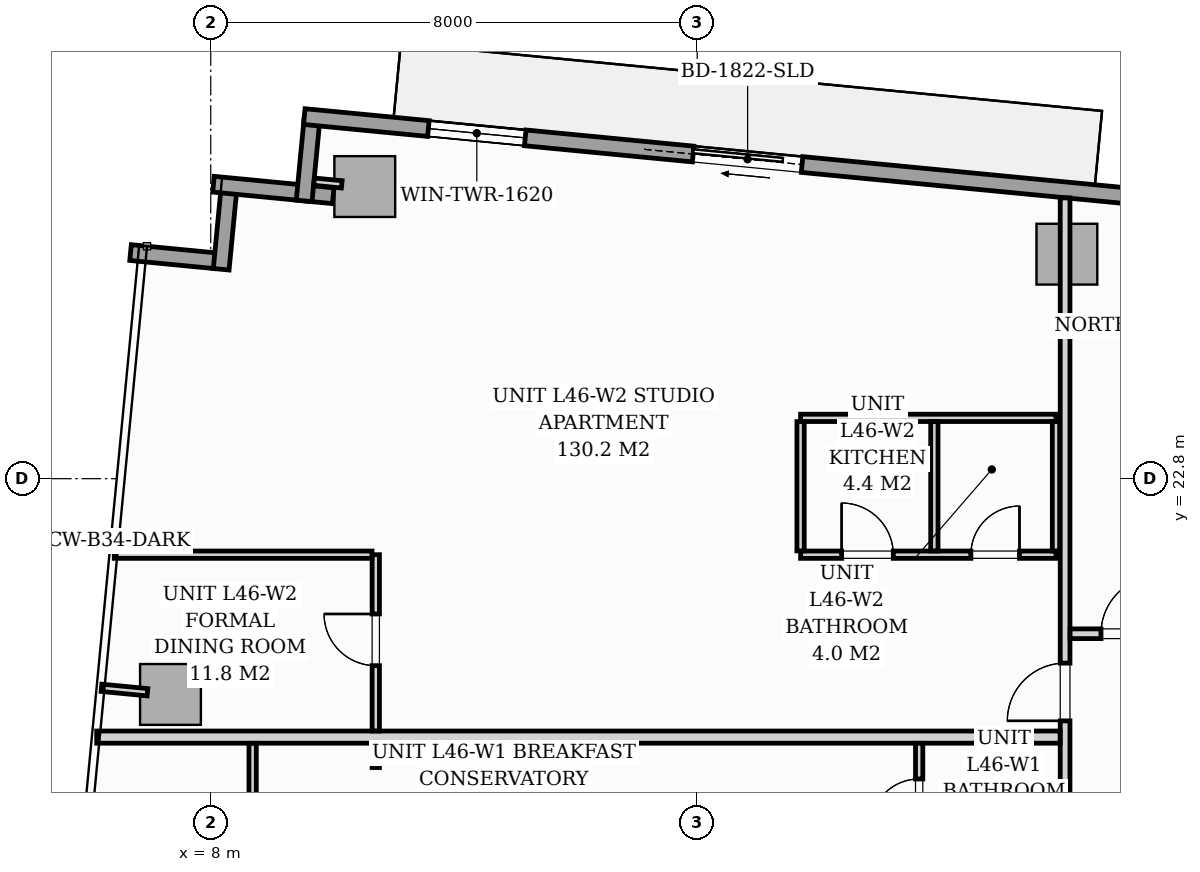
"""IFC4 building model, lengths in metres.
Left out: names, types, materials, properties, quantities, classifications, styles, units other than length and angle.
Written with IfcOpenShell. Run it as: python <this file> out.ifc"""

import sys

from ifc_helpers import new_model, si_unit, direction, frame, frame_2d, origin, origin_2d, place, context, subcontext, project, spatial, rectangle, extrude, source, transform, mapped, element, fill, save


model = new_model("IFC4")
c1 = context("Model", 3, precision=1e-05, world=origin(), true_north=direction((0.0, 1.0)))
c2 = subcontext(c1, "Body", "Model", "MODEL_VIEW")
j1 = project(units=[si_unit("LENGTHUNIT", "METRE"), si_unit("PLANEANGLEUNIT", "RADIAN")], contexts=[c1])
p1 = place(None, origin())
s1 = spatial("IfcSite", under=j1, at=p1, CompositionType="ELEMENT")
p2 = place(p1, origin())
s2 = spatial("IfcBuilding", under=s1, at=p2, CompositionType="ELEMENT")
p3 = place(p2, frame((0.0, 0.0, 159.8)))
s3 = spatial("IfcBuildingStorey", under=s2, at=p3, CompositionType="ELEMENT", Elevation=159.8)
m1 = source(origin(), c2, "Body", "SweptSolid", [
    extrude(rectangle(XDim=1.0, YDim=1.0, at=origin_2d()), origin(), (0.0, 0.0, 1.0), 3.194),
])
for number, where, z_axis, x_axis in (
    (1, (10.533, 27.604, 0.002), (0.0, 0.0, 1.0), (0.995, -0.096, 0.0)),
    (2, (22.08, 26.492, 0.002), (0.0, 0.0, 1.0), (0.995, -0.096, 0.0)),
    (3, (7.338, 19.252, 0.002), (0.0, 0.0, 1.0), (0.995, -0.096, 0.0)),
):
    element("IfcColumn", number, at=place(p3, frame(where, z_axis=z_axis, x_axis=x_axis)), inside=s3, PredefinedType="COLUMN", context=c2, shape_type="MappedRepresentation", body=[
        mapped(m1, transform((0.0, 0.0, 0.0), scale=1.0)),
    ])
p4 = place(p3, frame((6.681, 26.518, 0.0), z_axis=(0.0, 0.0, 1.0), x_axis=(0.995389446633, -0.095915846097, 0.0)))
e4 = element("IfcWall", 4, at=p4, inside=s3, PredefinedType="STANDARD", context=c2, shape_type="SweptSolid", body=[
    extrude(rectangle(XDim=1.395, YDim=0.26, at=frame_2d((0.697, 0.0))), origin(), (0.0, 0.0, 1.0), 2.9),
])
p5 = place(p3, frame((8.172, 26.244, 0.0), z_axis=(0.0, 0.0, 1.0), x_axis=(0.095725744959, 0.99540774648, 0.0)))
e5 = element("IfcWall", 5, at=p5, inside=s3, PredefinedType="STANDARD", context=c2, shape_type="SweptSolid", body=[
    extrude(rectangle(XDim=1.395, YDim=0.26, at=frame_2d((0.698, 0.0))), origin(), (0.0, 0.0, 1.0), 2.9),
])
p6 = place(p3, frame((8.045, 27.643, 0.0), z_axis=(0.0, 0.0, 1.0), x_axis=(0.995391147587, -0.095898192396, 0.0)))
e6 = element("IfcWall", 6, at=p6, inside=s3, PredefinedType="STANDARD", context=c2, shape_type="SweptSolid", body=[
    extrude(rectangle(XDim=1.978, YDim=0.26, at=frame_2d((0.989, 0.0))), origin(), (0.0, 0.0, 1.0), 2.9),
])
p7 = place(p3, frame((9.536, 27.368, 0.0), z_axis=(0.0, 0.0, 1.0), x_axis=(0.095915846097, 0.995389446633, 0.0)))
e7 = element("IfcWall", 7, at=p7, inside=s3, PredefinedType="STANDARD", context=c2, shape_type="SweptSolid", body=[
    extrude(rectangle(XDim=1.395, YDim=0.26, at=frame_2d((0.697, 0.0))), origin(), (0.0, 0.0, 1.0), 2.9),
])
p8 = place(p3, frame((9.539, 28.754, 0.0), z_axis=(0.0, 0.0, 1.0), x_axis=(0.995397345886, -0.09583383433, 0.0)))
e8 = element("IfcWall", 8, at=p8, inside=s3, PredefinedType="STANDARD", context=c2, shape_type="SweptSolid", body=[
    extrude(rectangle(XDim=17.01, YDim=0.26, at=frame_2d((8.505, 0.0))), origin(), (0.0, 0.0, 1.0), 2.9),
])
p9 = place(p8, frame((6.424, 0.0, 0.0)))
e9 = element("IfcOpeningElement", 9, at=p9, cuts=e8, PredefinedType="OPENING", context=c2, shape_type="SweptSolid", body=[
    extrude(rectangle(XDim=1.8, YDim=2.06, at=frame_2d((0.9, 1.03))), frame((0.0, 0.14, 0.0), z_axis=(0.0, -1.0, 0.0), x_axis=(1.0, 0.0, 0.0)), (0.0, 0.0, 1.0), 0.28),
])
p10 = place(p8, frame((2.05, 0.0, 0.65)))
e10 = element("IfcOpeningElement", 10, at=p10, cuts=e8, PredefinedType="OPENING", context=c2, shape_type="SweptSolid", body=[
    extrude(rectangle(XDim=1.6, YDim=1.5, at=frame_2d((0.8, 0.75))), frame((0.0, 0.14, 0.0), z_axis=(0.0, -1.0, 0.0), x_axis=(1.0, 0.0, 0.0)), (0.0, 0.0, 1.0), 0.28),
])
p11 = place(p3, frame((22.05, 12.732, 0.0), z_axis=(0.0, 0.0, 1.0), x_axis=(0.0, 1.0, 0.0)))
e11 = element("IfcWall", 11, at=p11, inside=s3, PredefinedType="PARTITIONING", context=c2, shape_type="SweptSolid", body=[
    extrude(rectangle(XDim=14.685, YDim=0.16, at=frame_2d((7.343, 0.0))), origin(), (0.0, 0.0, 1.0), 2.9),
])
p12 = place(p11, frame((0.493, 0.0, 0.0)))
e12 = element("IfcOpeningElement", 12, at=p12, cuts=e11, PredefinedType="OPENING", context=c2, shape_type="SweptSolid", body=[
    extrude(rectangle(XDim=0.95, YDim=2.06, at=frame_2d((0.475, 1.03))), frame((0.0, 0.09, 0.0), z_axis=(0.0, -1.0, 0.0), x_axis=(1.0, 0.0, 0.0)), (0.0, 0.0, 1.0), 0.18),
])
p13 = place(p11, frame((6.085, 0.0, 0.0)))
e13 = element("IfcOpeningElement", 13, at=p13, cuts=e11, PredefinedType="OPENING", context=c2, shape_type="SweptSolid", body=[
    extrude(rectangle(XDim=0.95, YDim=2.06, at=frame_2d((0.475, 1.03))), frame((0.0, 0.09, 0.0), z_axis=(0.0, -1.0, 0.0), x_axis=(1.0, 0.0, 0.0)), (0.0, 0.0, 1.0), 0.18),
])
p14 = place(p3, frame((6.125, 18.55, 0.0), z_axis=(0.0, 0.0, 1.0), x_axis=(1.0, 0.0, 0.0)))
e14 = element("IfcWall", 14, at=p14, inside=s3, PredefinedType="PARTITIONING", context=c2, shape_type="SweptSolid", body=[
    extrude(rectangle(XDim=15.843, YDim=0.2, at=frame_2d((7.921, 0.0))), origin(), (0.0, 0.0, 1.0), 2.023),
])
p15 = place(p3, frame((19.65, 14.5, 0.0), z_axis=(0.0, 0.0, 1.0), x_axis=(0.0, 1.0, 0.0)))
e15 = element("IfcWall", 15, at=p15, inside=s3, PredefinedType="PARTITIONING", context=c2, shape_type="SweptSolid", body=[
    extrude(rectangle(XDim=3.948, YDim=0.12, at=frame_2d((1.974, 0.0))), origin(), (0.0, 0.0, 1.0), 2.9),
])
p16 = place(p15, frame((0.563, 0.0, 0.0)))
e16 = element("IfcOpeningElement", 16, at=p16, cuts=e15, PredefinedType="OPENING", context=c2, shape_type="SweptSolid", body=[
    extrude(rectangle(XDim=0.85, YDim=2.05, at=frame_2d((0.425, 1.025))), frame((0.0, 0.07, 0.0), z_axis=(0.0, -1.0, 0.0), x_axis=(1.0, 0.0, 0.0)), (0.0, 0.0, 1.0), 0.14),
])
p17 = place(p15, frame((2.562, 0.0, 0.0)))
e17 = element("IfcOpeningElement", 17, at=p17, cuts=e15, PredefinedType="OPENING", context=c2, shape_type="SweptSolid", body=[
    extrude(rectangle(XDim=0.8, YDim=2.0, at=frame_2d((0.4, 1.0))), frame((0.0, 0.07, 0.0), z_axis=(0.0, -1.0, 0.0), x_axis=(1.0, 0.0, 0.0)), (0.0, 0.0, 1.0), 0.14),
])
p18 = place(p3, frame((8.689, 9.54, 0.0), z_axis=(0.0, 0.0, 1.0), x_axis=(0.0, 1.0, 0.0)))
e18 = element("IfcWall", 18, at=p18, inside=s3, PredefinedType="PARTITIONING", context=c2, shape_type="SweptSolid", body=[
    extrude(rectangle(XDim=8.908, YDim=0.12, at=frame_2d((4.454, 0.0))), origin(), (0.0, 0.0, 1.0), 2.343),
])
p19 = place(p18, frame((4.542, 0.0, 0.0)))
e19 = element("IfcOpeningElement", 19, at=p19, cuts=e18, PredefinedType="OPENING", context=c2, shape_type="SweptSolid", body=[
    extrude(rectangle(XDim=0.85, YDim=2.05, at=frame_2d((0.425, 1.025))), frame((0.0, 0.07, 0.0), z_axis=(0.0, -1.0, 0.0), x_axis=(1.0, 0.0, 0.0)), (0.0, 0.0, 1.0), 0.14),
])
p20 = place(p3, frame((17.7, 21.55, 0.0), z_axis=(0.0, 0.0, 1.0), x_axis=(1.0, 0.0, 0.0)))
e20 = element("IfcWall", 20, at=p20, inside=s3, PredefinedType="PARTITIONING", context=c2, shape_type="SweptSolid", body=[
    extrude(rectangle(XDim=4.2, YDim=0.12, at=frame_2d((2.1, 0.0))), origin(), (0.0, 0.0, 1.0), 2.9),
])
p21 = place(p20, frame((0.675, 0.0, 0.0)))
e21 = element("IfcOpeningElement", 21, at=p21, cuts=e20, PredefinedType="OPENING", context=c2, shape_type="SweptSolid", body=[
    extrude(rectangle(XDim=0.85, YDim=2.05, at=frame_2d((0.425, 1.025))), frame((0.0, 0.07, 0.0), z_axis=(0.0, -1.0, 0.0), x_axis=(1.0, 0.0, 0.0)), (0.0, 0.0, 1.0), 0.14),
])
p22 = place(p20, frame((2.8, 0.0, 0.0)))
e22 = element("IfcOpeningElement", 22, at=p22, cuts=e20, PredefinedType="OPENING", context=c2, shape_type="SweptSolid", body=[
    extrude(rectangle(XDim=0.8, YDim=2.0, at=frame_2d((0.4, 1.0))), frame((0.0, 0.07, 0.0), z_axis=(0.0, -1.0, 0.0), x_axis=(1.0, 0.0, 0.0)), (0.0, 0.0, 1.0), 0.14),
])
p23 = place(p3, frame((17.7, 23.8, 0.0), z_axis=(0.0, 0.0, 1.0), x_axis=(1.0, 0.0, 0.0)))
e23 = element("IfcWall", 23, at=p23, inside=s3, PredefinedType="PARTITIONING", context=c2, shape_type="SweptSolid", body=[
    extrude(rectangle(XDim=4.2, YDim=0.12, at=frame_2d((2.1, 0.0))), origin(), (0.0, 0.0, 1.0), 2.9),
])
for number, where, z_axis, x_axis in (
    (24, (17.7, 21.612, 0.0), (0.0, 0.0, 1.0), (0.0, 1.0, 0.0)),
    (25, (19.9, 21.612, 0.0), (0.0, 0.0, 1.0), (0.0, 1.0, 0.0)),
    (26, (21.9, 21.612, 0.0), (0.0, 0.0, 1.0), (0.0, 1.0, 0.0)),
):
    element("IfcWall", number, at=place(p3, frame(where, z_axis=z_axis, x_axis=x_axis)), inside=s3, PredefinedType="PARTITIONING", context=c2, shape_type="SweptSolid", body=[
        extrude(rectangle(XDim=2.126, YDim=0.12, at=frame_2d((1.063, 0.0))), origin(), (0.0, 0.0, 1.0), 2.9),
    ])
p24 = place(p3, frame((10.714, 18.05, 0.0), z_axis=(0.0, 0.0, 1.0), x_axis=(0.0, 1.0, 0.0)))
e27 = element("IfcWall", 27, at=p24, inside=s3, PredefinedType="PARTITIONING", context=c2, shape_type="SweptSolid", body=[
    extrude(rectangle(XDim=0.398, YDim=0.12, at=frame_2d((0.199, 0.0))), origin(), (0.0, 0.0, 1.0), 2.9),
])
p25 = place(p3, frame((10.714, 18.652, 0.0), z_axis=(0.0, 0.0, 1.0), x_axis=(0.0, 1.0, 0.0)))
e28 = element("IfcWall", 28, at=p25, inside=s3, PredefinedType="PARTITIONING", context=c2, shape_type="SweptSolid", body=[
    extrude(rectangle(XDim=2.898, YDim=0.12, at=frame_2d((1.449, 0.0))), origin(), (0.0, 0.0, 1.0), 2.9),
])
p26 = place(p25, frame((1.073, 0.0, 0.0)))
e29 = element("IfcOpeningElement", 29, at=p26, cuts=e28, PredefinedType="OPENING", context=c2, shape_type="SweptSolid", body=[
    extrude(rectangle(XDim=0.85, YDim=2.05, at=frame_2d((0.425, 1.025))), frame((0.0, 0.07, 0.0), z_axis=(0.0, -1.0, 0.0), x_axis=(1.0, 0.0, 0.0)), (0.0, 0.0, 1.0), 0.14),
])
p27 = place(p3, frame((6.414, 21.55, 0.0), z_axis=(0.0, 0.0, 1.0), x_axis=(1.0, 0.0, 0.0)))
e30 = element("IfcWall", 30, at=p27, inside=s3, PredefinedType="PARTITIONING", context=c2, shape_type="SweptSolid", body=[
    extrude(rectangle(XDim=4.238, YDim=0.12, at=frame_2d((2.119, 0.0))), origin(), (0.0, 0.0, 1.0), 2.9),
])
p28 = place(p3, frame((22.132, 20.25, 0.0), z_axis=(0.0, 0.0, 1.0), x_axis=(1.0, 0.0, 0.0)))
e31 = element("IfcWall", 31, at=p28, inside=s3, PredefinedType="PARTITIONING", context=c2, shape_type="SweptSolid", body=[
    extrude(rectangle(XDim=1.886, YDim=0.16, at=frame_2d((0.943, 0.0))), origin(), (0.0, 0.0, 1.0), 2.9),
])
p29 = place(p28, frame((0.508, 0.0, 0.0)))
e32 = element("IfcOpeningElement", 32, at=p29, cuts=e31, PredefinedType="OPENING", context=c2, shape_type="SweptSolid", body=[
    extrude(rectangle(XDim=0.95, YDim=2.06, at=frame_2d((0.475, 1.03))), frame((0.0, 0.09, 0.0), z_axis=(0.0, -1.0, 0.0), x_axis=(1.0, 0.0, 0.0)), (0.0, 0.0, 1.0), 0.18),
])
p30 = place(p3, frame((10.155, 27.64, 0.0), z_axis=(0.0, 0.0, 1.0), x_axis=(-0.995435366701, 0.095438098896, 0.0)))
e33 = element("IfcWall", 33, at=p30, inside=s3, PredefinedType="PARTITIONING", context=c2, shape_type="SweptSolid", body=[
    extrude(rectangle(XDim=0.458, YDim=0.12, at=frame_2d((0.229, 0.0))), origin(), (0.0, 0.0, 1.0), 2.9),
])
p31 = place(p3, frame((6.959, 19.288, 0.0), z_axis=(0.0, 0.0, 1.0), x_axis=(-0.995377786728, 0.096036772582, 0.0)))
e34 = element("IfcWall", 34, at=p31, inside=s3, PredefinedType="PARTITIONING", context=c2, shape_type="SweptSolid", body=[
    extrude(rectangle(XDim=0.76, YDim=0.12, at=frame_2d((0.38, 0.0))), origin(), (0.0, 0.0, 1.0), 2.9),
])
m2 = source(origin(), c2, "Body", "SweptSolid", [
    extrude(rectangle(XDim=1.8, YDim=2.06, at=frame_2d((0.9, 1.03))), frame((0.0, 0.025, 0.0), z_axis=(0.0, -1.0, 0.0), x_axis=(1.0, 0.0, 0.0)), (0.0, 0.0, 1.0), 0.05),
])
p32 = place(p9, origin())
e35 = element("IfcDoor", 35, at=p32, inside=s3, OperationType="SLIDING_TO_LEFT", PredefinedType="DOOR", context=c2, shape_type="MappedRepresentation", body=[
    mapped(m2, transform((0.0, 0.0, 0.0), scale=1.0)),
])
fill(e9, e35)
m3 = source(origin(), c2, "Body", "SweptSolid", [
    extrude(rectangle(XDim=1.6, YDim=1.5, at=frame_2d((0.8, 0.75))), frame((0.0, 0.03, 0.0), z_axis=(0.0, -1.0, 0.0), x_axis=(1.0, 0.0, 0.0)), (0.0, 0.0, 1.0), 0.06),
])
p33 = place(p10, origin())
e36 = element("IfcWindow", 36, at=p33, inside=s3, PartitioningType="SINGLE_PANEL", PredefinedType="WINDOW", context=c2, shape_type="MappedRepresentation", body=[
    mapped(m3, transform((0.0, 0.0, 0.0), scale=1.0)),
])
fill(e10, e36)
m4 = source(origin(), c2, "Body", "SweptSolid", [
    extrude(rectangle(XDim=0.8, YDim=2.0, at=frame_2d((0.4, 1.0))), frame((0.0, 0.025, 0.0), z_axis=(0.0, -1.0, 0.0), x_axis=(1.0, 0.0, 0.0)), (0.0, 0.0, 1.0), 0.05),
])
p34 = place(p17, origin())
e37 = element("IfcDoor", 37, at=p34, inside=s3, OperationType="SINGLE_SWING_LEFT", PredefinedType="DOOR", context=c2, shape_type="MappedRepresentation", body=[
    mapped(m4, transform((0.0, 0.0, 0.0), scale=1.0)),
])
fill(e17, e37)
m5 = source(origin(), c2, "Body", "SweptSolid", [
    extrude(rectangle(XDim=0.95, YDim=2.06, at=frame_2d((0.475, 1.03))), frame((0.0, 0.025, 0.0), z_axis=(0.0, -1.0, 0.0), x_axis=(1.0, 0.0, 0.0)), (0.0, 0.0, 1.0), 0.05),
])
p35 = place(p13, origin())
e38 = element("IfcDoor", 38, at=p35, inside=s3, OperationType="SINGLE_SWING_LEFT", PredefinedType="DOOR", context=c2, shape_type="MappedRepresentation", body=[
    mapped(m5, transform((0.0, 0.0, 0.0), scale=1.0)),
])
fill(e13, e38)
m6 = source(origin(), c2, "Body", "SweptSolid", [
    extrude(rectangle(XDim=0.85, YDim=2.05, at=frame_2d((0.425, 1.025))), frame((0.0, 0.025, 0.0), z_axis=(0.0, -1.0, 0.0), x_axis=(1.0, 0.0, 0.0)), (0.0, 0.0, 1.0), 0.05),
])
p36 = place(p26, origin())
e39 = element("IfcDoor", 39, at=p36, inside=s3, OperationType="SINGLE_SWING_RIGHT", PredefinedType="DOOR", context=c2, shape_type="MappedRepresentation", body=[
    mapped(m6, transform((0.0, 0.0, 0.0), scale=1.0)),
])
fill(e29, e39)
p37 = place(p21, origin())
e40 = element("IfcDoor", 40, at=p37, inside=s3, OperationType="SINGLE_SWING_LEFT", PredefinedType="DOOR", context=c2, shape_type="MappedRepresentation", body=[
    mapped(m6, transform((0.0, 0.0, 0.0), scale=1.0)),
])
fill(e21, e40)
p38 = place(p22, origin())
e41 = element("IfcDoor", 41, at=p38, inside=s3, OperationType="SINGLE_SWING_RIGHT", PredefinedType="DOOR", context=c2, shape_type="MappedRepresentation", body=[
    mapped(m4, transform((0.0, 0.0, 0.0), scale=1.0)),
])
fill(e22, e41)
p39 = place(p29, origin())
e42 = element("IfcDoor", 42, at=p39, inside=s3, OperationType="SINGLE_SWING_RIGHT", PredefinedType="DOOR", context=c2, shape_type="MappedRepresentation", body=[
    mapped(m5, transform((0.0, 0.0, 0.0), scale=1.0)),
])
fill(e32, e42)
save(model, sys.argv[1])
